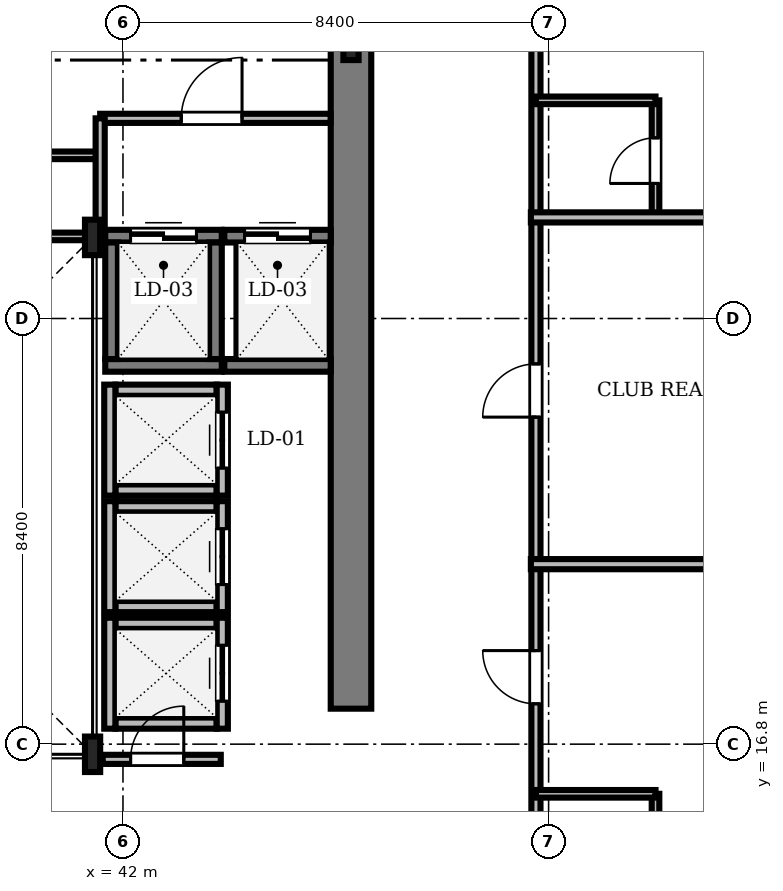
"""IFC4 building model, lengths in metres.
Left out: names, types, materials, properties, quantities, classifications, styles, units other than length and angle.
Written with IfcOpenShell. Run it as: python <this file> out.ifc"""

import sys

from ifc_helpers import new_model, si_unit, direction, frame, frame_2d, origin, origin_2d, place, context, subcontext, project, spatial, rectangle, i_section, extrude, source, transform, mapped, element, fill, save


model = new_model("IFC4")
c1 = context("Model", 3, precision=1e-05, world=origin(), true_north=direction((0.0, 1.0)))
c2 = subcontext(c1, "Body", "Model", "MODEL_VIEW")
j1 = project(units=[si_unit("LENGTHUNIT", "METRE"), si_unit("PLANEANGLEUNIT", "RADIAN")], contexts=[c1])
p1 = place(None, origin())
s1 = spatial("IfcSite", under=j1, at=p1, CompositionType="ELEMENT")
p2 = place(p1, origin())
s2 = spatial("IfcBuilding", under=s1, at=p2, CompositionType="ELEMENT")
p3 = place(p2, frame((0.0, 0.0, 211.05)))
s3 = spatial("IfcBuildingStorey", under=s2, at=p3, CompositionType="ELEMENT", Elevation=211.05)
m1 = source(origin(), c2, "Body", "SweptSolid", [
    extrude(rectangle(XDim=13.15, YDim=0.8, at=frame_2d((6.575, 0.0))), origin(), (0.0, 0.0, 1.0), 3.53),
])
p4 = place(p3, frame((46.5, 17.5, 0.0), z_axis=(0.0, 0.0, 1.0), x_axis=(0.0, 1.0, 0.0)))
e1 = element("IfcWall", 1, at=p4, inside=s3, PredefinedType="SHEAR", context=c2, shape_type="MappedRepresentation", body=[
    mapped(m1, transform((0.0, 0.0, 0.0), scale=1.0)),
])
m2 = source(origin(), c2, "Body", "SweptSolid", [
    extrude(i_section(OverallWidth=0.3, OverallDepth=0.7, WebThickness=0.017, FlangeThickness=0.032, FilletRadius=0.027, at=origin_2d()), origin(), (0.0, 0.0, 1.0), 3.53),
])
for number, where, z_axis, x_axis in (
    (2, (41.4, 16.6, 0.0), (0.0, 0.0, 1.0), (1.0, 0.0, 0.0)),
    (3, (41.4, 26.8, 0.0), (0.0, 0.0, 1.0), (1.0, 0.0, 0.0)),
    (4, (46.5, 30.65, 0.0), (0.0, 0.0, 1.0), (1.0, 0.0, 0.0)),
):
    element("IfcColumn", number, at=place(p3, frame(where, z_axis=z_axis, x_axis=x_axis)), inside=s3, PredefinedType="COLUMN", context=c2, shape_type="MappedRepresentation", body=[
        mapped(m2, transform((0.0, 0.0, 0.0), scale=1.0)),
    ])
m3 = source(origin(), c2, "Body", "SweptSolid", [
    extrude(rectangle(XDim=2.0, YDim=0.22, at=frame_2d((1.0, 0.0))), origin(), (0.0, 0.0, 1.0), 3.53),
])
for number, where, z_axis, x_axis in (
    (5, (41.85, 21.815, 0.0), (0.0, 0.0, 1.0), (1.0, 0.0, 0.0)),
    (6, (41.85, 23.785, 0.0), (0.0, 0.0, 1.0), (1.0, 0.0, 0.0)),
):
    element("IfcWall", number, at=place(p3, frame(where, z_axis=z_axis, x_axis=x_axis)), inside=s3, PredefinedType="SOLIDWALL", context=c2, shape_type="MappedRepresentation", body=[
        mapped(m3, transform((0.0, 0.0, 0.0), scale=1.0)),
    ])
m4 = source(origin(), c2, "Body", "SweptSolid", [
    extrude(rectangle(XDim=2.19, YDim=0.22, at=frame_2d((1.095, 0.0))), origin(), (0.0, 0.0, 1.0), 3.53),
])
p5 = place(p3, frame((41.74, 21.705, 0.0), z_axis=(0.0, 0.0, 1.0), x_axis=(0.0, 1.0, 0.0)))
e7 = element("IfcWall", 7, at=p5, inside=s3, PredefinedType="SOLIDWALL", context=c2, shape_type="MappedRepresentation", body=[
    mapped(m4, transform((0.0, 0.0, 0.0), scale=1.0)),
])
p6 = place(p3, frame((43.96, 21.705, 0.0), z_axis=(0.0, 0.0, 1.0), x_axis=(0.0, 1.0, 0.0)))
e8 = element("IfcWall", 8, at=p6, inside=s3, PredefinedType="SOLIDWALL", context=c2, shape_type="MappedRepresentation", body=[
    mapped(m4, transform((0.0, 0.0, 0.0), scale=1.0)),
])
m5 = source(origin(), c2, "Body", "SweptSolid", [
    extrude(rectangle(XDim=1.1, YDim=2.2, at=frame_2d((0.55, 1.1))), frame((0.0, 0.12, 0.0), z_axis=(0.0, -1.0, 0.0), x_axis=(1.0, 0.0, 0.0)), (0.0, 0.0, 1.0), 0.24),
])
p7 = place(p6, frame((0.545, 0.0, 0.0)))
e9 = element("IfcOpeningElement", 9, at=p7, cuts=e8, PredefinedType="OPENING", context=c2, shape_type="MappedRepresentation", body=[
    mapped(m5, transform((0.0, 0.0, 0.0), scale=1.0)),
])
for number, where, z_axis, x_axis in (
    (10, (41.85, 19.515, 0.0), (0.0, 0.0, 1.0), (1.0, 0.0, 0.0)),
    (11, (41.85, 21.485, 0.0), (0.0, 0.0, 1.0), (1.0, 0.0, 0.0)),
):
    element("IfcWall", number, at=place(p3, frame(where, z_axis=z_axis, x_axis=x_axis)), inside=s3, PredefinedType="SOLIDWALL", context=c2, shape_type="MappedRepresentation", body=[
        mapped(m3, transform((0.0, 0.0, 0.0), scale=1.0)),
    ])
p8 = place(p3, frame((41.74, 19.405, 0.0), z_axis=(0.0, 0.0, 1.0), x_axis=(0.0, 1.0, 0.0)))
e12 = element("IfcWall", 12, at=p8, inside=s3, PredefinedType="SOLIDWALL", context=c2, shape_type="MappedRepresentation", body=[
    mapped(m4, transform((0.0, 0.0, 0.0), scale=1.0)),
])
p9 = place(p3, frame((43.96, 19.405, 0.0), z_axis=(0.0, 0.0, 1.0), x_axis=(0.0, 1.0, 0.0)))
e13 = element("IfcWall", 13, at=p9, inside=s3, PredefinedType="SOLIDWALL", context=c2, shape_type="MappedRepresentation", body=[
    mapped(m4, transform((0.0, 0.0, 0.0), scale=1.0)),
])
p10 = place(p9, frame((0.545, 0.0, 0.0)))
e14 = element("IfcOpeningElement", 14, at=p10, cuts=e13, PredefinedType="OPENING", context=c2, shape_type="MappedRepresentation", body=[
    mapped(m5, transform((0.0, 0.0, 0.0), scale=1.0)),
])
for number, where, z_axis, x_axis in (
    (15, (41.85, 17.215, 0.0), (0.0, 0.0, 1.0), (1.0, 0.0, 0.0)),
    (16, (41.85, 19.185, 0.0), (0.0, 0.0, 1.0), (1.0, 0.0, 0.0)),
):
    element("IfcWall", number, at=place(p3, frame(where, z_axis=z_axis, x_axis=x_axis)), inside=s3, PredefinedType="SOLIDWALL", context=c2, shape_type="MappedRepresentation", body=[
        mapped(m3, transform((0.0, 0.0, 0.0), scale=1.0)),
    ])
p11 = place(p3, frame((41.74, 17.105, 0.0), z_axis=(0.0, 0.0, 1.0), x_axis=(0.0, 1.0, 0.0)))
e17 = element("IfcWall", 17, at=p11, inside=s3, PredefinedType="SOLIDWALL", context=c2, shape_type="MappedRepresentation", body=[
    mapped(m4, transform((0.0, 0.0, 0.0), scale=1.0)),
])
p12 = place(p3, frame((43.96, 17.105, 0.0), z_axis=(0.0, 0.0, 1.0), x_axis=(0.0, 1.0, 0.0)))
e18 = element("IfcWall", 18, at=p12, inside=s3, PredefinedType="SOLIDWALL", context=c2, shape_type="MappedRepresentation", body=[
    mapped(m4, transform((0.0, 0.0, 0.0), scale=1.0)),
])
p13 = place(p12, frame((0.545, 0.0, 0.0)))
e19 = element("IfcOpeningElement", 19, at=p13, cuts=e18, PredefinedType="OPENING", context=c2, shape_type="MappedRepresentation", body=[
    mapped(m5, transform((0.0, 0.0, 0.0), scale=1.0)),
])
m6 = source(origin(), c2, "Body", "SweptSolid", [
    extrude(rectangle(XDim=2.3, YDim=0.25, at=frame_2d((1.15, 0.0))), origin(), (0.0, 0.0, 1.0), 3.53),
])
p14 = place(p3, frame((41.65, 24.275, 0.0), z_axis=(0.0, 0.0, 1.0), x_axis=(1.0, 0.0, 0.0)))
e20 = element("IfcWall", 20, at=p14, inside=s3, PredefinedType="SOLIDWALL", context=c2, shape_type="MappedRepresentation", body=[
    mapped(m6, transform((0.0, 0.0, 0.0), scale=1.0)),
])
p15 = place(p3, frame((41.65, 26.825, 0.0), z_axis=(0.0, 0.0, 1.0), x_axis=(1.0, 0.0, 0.0)))
e21 = element("IfcWall", 21, at=p15, inside=s3, PredefinedType="SOLIDWALL", context=c2, shape_type="MappedRepresentation", body=[
    mapped(m6, transform((0.0, 0.0, 0.0), scale=1.0)),
])
m7 = source(origin(), c2, "Body", "SweptSolid", [
    extrude(rectangle(XDim=1.3, YDim=2.3, at=frame_2d((0.65, 1.15))), frame((0.0, 0.135, 0.0), z_axis=(0.0, -1.0, 0.0), x_axis=(1.0, 0.0, 0.0)), (0.0, 0.0, 1.0), 0.27),
])
p16 = place(p15, frame((0.5, 0.0, 0.0)))
e22 = element("IfcOpeningElement", 22, at=p16, cuts=e21, PredefinedType="OPENING", context=c2, shape_type="MappedRepresentation", body=[
    mapped(m7, transform((0.0, 0.0, 0.0), scale=1.0)),
])
for number, where, z_axis, x_axis in (
    (23, (41.775, 24.4, 0.0), (0.0, 0.0, 1.0), (0.0, 1.0, 0.0)),
    (24, (43.825, 24.4, 0.0), (0.0, 0.0, 1.0), (0.0, 1.0, 0.0)),
):
    element("IfcWall", number, at=place(p3, frame(where, z_axis=z_axis, x_axis=x_axis)), inside=s3, PredefinedType="SOLIDWALL", context=c2, shape_type="MappedRepresentation", body=[
        mapped(m6, transform((0.0, 0.0, 0.0), scale=1.0)),
    ])
m8 = source(origin(), c2, "Body", "SweptSolid", [
    extrude(rectangle(XDim=2.1, YDim=0.25, at=frame_2d((1.05, 0.0))), origin(), (0.0, 0.0, 1.0), 3.53),
])
p17 = place(p3, frame((44.0, 24.275, 0.0), z_axis=(0.0, 0.0, 1.0), x_axis=(1.0, 0.0, 0.0)))
e25 = element("IfcWall", 25, at=p17, inside=s3, PredefinedType="SOLIDWALL", context=c2, shape_type="MappedRepresentation", body=[
    mapped(m8, transform((0.0, 0.0, 0.0), scale=1.0)),
])
p18 = place(p3, frame((44.0, 26.825, 0.0), z_axis=(0.0, 0.0, 1.0), x_axis=(1.0, 0.0, 0.0)))
e26 = element("IfcWall", 26, at=p18, inside=s3, PredefinedType="SOLIDWALL", context=c2, shape_type="MappedRepresentation", body=[
    mapped(m8, transform((0.0, 0.0, 0.0), scale=1.0)),
])
p19 = place(p18, frame((0.4, 0.0, 0.0)))
e27 = element("IfcOpeningElement", 27, at=p19, cuts=e26, PredefinedType="OPENING", context=c2, shape_type="MappedRepresentation", body=[
    mapped(m7, transform((0.0, 0.0, 0.0), scale=1.0)),
])
m9 = source(origin(), c2, "Body", "SweptSolid", [
    extrude(rectangle(XDim=27.59, YDim=0.18, at=frame_2d((13.795, 0.0))), origin(), (0.0, 0.0, 1.0), 2.972),
])
p20 = place(p3, frame((50.15, 13.51, 0.0), z_axis=(0.0, 0.0, 1.0), x_axis=(0.0, 1.0, 0.0)))
e28 = element("IfcWall", 28, at=p20, inside=s3, PredefinedType="PARTITIONING", context=c2, shape_type="MappedRepresentation", body=[
    mapped(m9, transform((0.0, 0.0, 0.0), scale=1.0)),
])
m10 = source(origin(), c2, "Body", "SweptSolid", [
    extrude(rectangle(XDim=1.05, YDim=2.2, at=frame_2d((0.525, 1.1))), frame((0.0, 0.1, 0.0), z_axis=(0.0, -1.0, 0.0), x_axis=(1.0, 0.0, 0.0)), (0.0, 0.0, 1.0), 0.2),
])
p21 = place(p20, frame((4.086, 0.0, 0.0)))
e29 = element("IfcOpeningElement", 29, at=p21, cuts=e28, PredefinedType="OPENING", context=c2, shape_type="MappedRepresentation", body=[
    mapped(m10, transform((0.0, 0.0, 0.0), scale=1.0)),
])
p22 = place(p20, frame((9.744, 0.0, 0.0)))
e30 = element("IfcOpeningElement", 30, at=p22, cuts=e28, PredefinedType="OPENING", context=c2, shape_type="MappedRepresentation", body=[
    mapped(m10, transform((0.0, 0.0, 0.0), scale=1.0)),
])
p23 = place(p20, frame((17.771, 0.0, 0.0)))
e31 = element("IfcOpeningElement", 31, at=p23, cuts=e28, PredefinedType="OPENING", context=c2, shape_type="MappedRepresentation", body=[
    mapped(m10, transform((0.0, 0.0, 0.0), scale=1.0)),
])
p24 = place(p20, frame((24.614, 0.0, 0.0)))
e32 = element("IfcOpeningElement", 32, at=p24, cuts=e28, PredefinedType="OPENING", context=c2, shape_type="MappedRepresentation", body=[
    mapped(m10, transform((0.0, 0.0, 0.0), scale=1.0)),
])
m11 = source(origin(), c2, "Body", "SweptSolid", [
    extrude(rectangle(XDim=4.548, YDim=0.18, at=frame_2d((2.274, 0.0))), origin(), (0.0, 0.0, 1.0), 3.162),
])
p25 = place(p3, frame((41.55, 29.15, 0.0), z_axis=(0.0, 0.0, 1.0), x_axis=(1.0, 0.0, 0.0)))
e33 = element("IfcWall", 33, at=p25, inside=s3, PredefinedType="PARTITIONING", context=c2, shape_type="MappedRepresentation", body=[
    mapped(m11, transform((0.0, 0.0, 0.0), scale=1.0)),
])
m12 = source(origin(), c2, "Body", "SweptSolid", [
    extrude(rectangle(XDim=1.2, YDim=2.2, at=frame_2d((0.6, 1.1))), frame((0.0, 0.1, 0.0), z_axis=(0.0, -1.0, 0.0), x_axis=(1.0, 0.0, 0.0)), (0.0, 0.0, 1.0), 0.2),
])
p26 = place(p25, frame((1.6, 0.0, 0.0)))
e34 = element("IfcOpeningElement", 34, at=p26, cuts=e33, PredefinedType="OPENING", context=c2, shape_type="MappedRepresentation", body=[
    mapped(m12, transform((0.0, 0.0, 0.0), scale=1.0)),
])
m13 = source(origin(), c2, "Body", "SweptSolid", [
    extrude(rectangle(XDim=2.74, YDim=0.15, at=frame_2d((1.37, 0.0))), origin(), (0.0, 0.0, 1.0), 3.53),
])
p27 = place(p3, frame((38.78, 28.42, 0.0), z_axis=(0.0, 0.0, 1.0), x_axis=(1.0, 0.0, 0.0)))
e35 = element("IfcWall", 35, at=p27, inside=s3, PredefinedType="PARTITIONING", context=c2, shape_type="MappedRepresentation", body=[
    mapped(m13, transform((0.0, 0.0, 0.0), scale=1.0)),
])
m14 = source(origin(), c2, "Body", "SweptSolid", [
    extrude(rectangle(XDim=0.92, YDim=2.1, at=frame_2d((0.46, 1.05))), frame((0.0, 0.085, 0.0), z_axis=(0.0, -1.0, 0.0), x_axis=(1.0, 0.0, 0.0)), (0.0, 0.0, 1.0), 0.17),
])
p28 = place(p27, frame((0.63, 0.0, 0.0)))
e36 = element("IfcOpeningElement", 36, at=p28, cuts=e35, PredefinedType="OPENING", context=c2, shape_type="MappedRepresentation", body=[
    mapped(m14, transform((0.0, 0.0, 0.0), scale=1.0)),
])
m15 = source(origin(), c2, "Body", "SweptSolid", [
    extrude(rectangle(XDim=2.33, YDim=0.18, at=frame_2d((1.165, 0.0))), origin(), (0.0, 0.0, 1.0), 2.972),
])
p29 = place(p3, frame((41.6, 16.5, 0.0), z_axis=(0.0, 0.0, 1.0), x_axis=(1.0, 0.0, 0.0)))
e37 = element("IfcWall", 37, at=p29, inside=s3, PredefinedType="PARTITIONING", context=c2, shape_type="MappedRepresentation", body=[
    mapped(m15, transform((0.0, 0.0, 0.0), scale=1.0)),
])
p30 = place(p29, frame((0.55, 0.0, 0.0)))
e38 = element("IfcOpeningElement", 38, at=p30, cuts=e37, PredefinedType="OPENING", context=c2, shape_type="MappedRepresentation", body=[
    mapped(m10, transform((0.0, 0.0, 0.0), scale=1.0)),
])
m16 = source(origin(), c2, "Body", "SweptSolid", [
    extrude(rectangle(XDim=2.29, YDim=0.15, at=frame_2d((1.145, 0.0))), origin(), (0.0, 0.0, 1.0), 2.972),
])
p31 = place(p3, frame((52.51, 13.53, 0.0), z_axis=(0.0, 0.0, 1.0), x_axis=(0.0, 1.0, 0.0)))
e39 = element("IfcWall", 39, at=p31, inside=s3, PredefinedType="PARTITIONING", context=c2, shape_type="MappedRepresentation", body=[
    mapped(m16, transform((0.0, 0.0, 0.0), scale=1.0)),
])
m17 = source(origin(), c2, "Body", "SweptSolid", [
    extrude(rectangle(XDim=0.9, YDim=2.1, at=frame_2d((0.45, 1.05))), frame((0.0, 0.085, 0.0), z_axis=(0.0, -1.0, 0.0), x_axis=(1.0, 0.0, 0.0)), (0.0, 0.0, 1.0), 0.17),
])
p32 = place(p31, frame((0.65, 0.0, 0.0)))
e40 = element("IfcOpeningElement", 40, at=p32, cuts=e39, PredefinedType="OPENING", context=c2, shape_type="MappedRepresentation", body=[
    mapped(m17, transform((0.0, 0.0, 0.0), scale=1.0)),
])
m18 = source(origin(), c2, "Body", "SweptSolid", [
    extrude(rectangle(XDim=2.29, YDim=0.15, at=frame_2d((1.145, 0.0))), origin(), (0.0, 0.0, 1.0), 2.972),
])
p33 = place(p3, frame((52.51, 27.215, 0.0), z_axis=(0.0, 0.0, 1.0), x_axis=(0.0, 1.0, 0.0)))
e41 = element("IfcWall", 41, at=p33, inside=s3, PredefinedType="PARTITIONING", context=c2, shape_type="MappedRepresentation", body=[
    mapped(m18, transform((0.0, 0.0, 0.0), scale=1.0)),
])
p34 = place(p33, frame((0.65, 0.0, 0.0)))
e42 = element("IfcOpeningElement", 42, at=p34, cuts=e41, PredefinedType="OPENING", context=c2, shape_type="MappedRepresentation", body=[
    mapped(m17, transform((0.0, 0.0, 0.0), scale=1.0)),
])
m19 = source(origin(), c2, "Body", "SweptSolid", [
    extrude(rectangle(XDim=7.528, YDim=0.2, at=frame_2d((3.764, 0.0))), origin(), (0.0, 0.0, 1.0), 2.772),
])
p35 = place(p3, frame((50.05, 20.352, 0.0), z_axis=(0.0, 0.0, 1.0), x_axis=(1.0, 0.0, 0.0)))
e43 = element("IfcWall", 43, at=p35, inside=s3, PredefinedType="PARTITIONING", context=c2, shape_type="MappedRepresentation", body=[
    mapped(m19, transform((0.0, 0.0, 0.0), scale=1.0)),
])
m20 = source(origin(), c2, "Body", "SweptSolid", [
    extrude(rectangle(XDim=7.72, YDim=0.2, at=frame_2d((3.86, 0.0))), origin(), (0.0, 0.0, 1.0), 2.772),
])
p36 = place(p3, frame((50.05, 27.195, 0.0), z_axis=(0.0, 0.0, 1.0), x_axis=(1.0, 0.0, 0.0)))
e44 = element("IfcWall", 44, at=p36, inside=s3, PredefinedType="PARTITIONING", context=c2, shape_type="MappedRepresentation", body=[
    mapped(m20, transform((0.0, 0.0, 0.0), scale=1.0)),
])
m21 = source(origin(), c2, "Body", "SweptSolid", [
    extrude(rectangle(XDim=2.74, YDim=0.15, at=frame_2d((1.37, 0.0))), origin(), (0.0, 0.0, 1.0), 2.972),
])
p37 = place(p3, frame((38.78, 26.82, 0.0), z_axis=(0.0, 0.0, 1.0), x_axis=(1.0, 0.0, 0.0)))
e45 = element("IfcWall", 45, at=p37, inside=s3, PredefinedType="PARTITIONING", context=c2, shape_type="MappedRepresentation", body=[
    mapped(m21, transform((0.0, 0.0, 0.0), scale=1.0)),
])
m22 = source(origin(), c2, "Body", "SweptSolid", [
    extrude(rectangle(XDim=2.36, YDim=0.15, at=frame_2d((1.18, 0.0))), origin(), (0.0, 0.0, 1.0), 3.53),
])
for number, where, z_axis, x_axis in (
    (46, (50.15, 15.82, 0.0), (0.0, 0.0, 1.0), (1.0, 0.0, 0.0)),
    (47, (50.15, 29.505, 0.0), (0.0, 0.0, 1.0), (1.0, 0.0, 0.0)),
):
    element("IfcWall", number, at=place(p3, frame(where, z_axis=z_axis, x_axis=x_axis)), inside=s3, PredefinedType="PARTITIONING", context=c2, shape_type="MappedRepresentation", body=[
        mapped(m22, transform((0.0, 0.0, 0.0), scale=1.0)),
    ])
m23 = source(origin(), c2, "Body", "SweptSolid", [
    extrude(rectangle(XDim=2.35, YDim=0.18, at=frame_2d((1.175, 0.0))), origin(), (0.0, 0.0, 1.0), 2.972),
])
p38 = place(p3, frame((41.55, 26.8, 0.0), z_axis=(0.0, 0.0, 1.0), x_axis=(0.0, 1.0, 0.0)))
e48 = element("IfcWall", 48, at=p38, inside=s3, PredefinedType="PARTITIONING", context=c2, shape_type="MappedRepresentation", body=[
    mapped(m23, transform((0.0, 0.0, 0.0), scale=1.0)),
])
m24 = source(origin(), c2, "Body", "SweptSolid", [
    extrude(rectangle(XDim=1.1, YDim=2.2, at=frame_2d((0.55, 1.1))), frame((0.0, 0.025, 0.0), z_axis=(0.0, -1.0, 0.0), x_axis=(1.0, 0.0, 0.0)), (0.0, 0.0, 1.0), 0.05),
])
p39 = place(p7, origin())
e49 = element("IfcDoor", 49, at=p39, inside=s3, OperationType="DOUBLE_DOOR_SLIDING", PredefinedType="DOOR", context=c2, shape_type="MappedRepresentation", body=[
    mapped(m24, transform((0.0, 0.0, 0.0), scale=1.0)),
])
fill(e9, e49)
p40 = place(p10, origin())
e50 = element("IfcDoor", 50, at=p40, inside=s3, OperationType="DOUBLE_DOOR_SLIDING", PredefinedType="DOOR", context=c2, shape_type="MappedRepresentation", body=[
    mapped(m24, transform((0.0, 0.0, 0.0), scale=1.0)),
])
fill(e14, e50)
p41 = place(p13, origin())
e51 = element("IfcDoor", 51, at=p41, inside=s3, OperationType="DOUBLE_DOOR_SLIDING", PredefinedType="DOOR", context=c2, shape_type="MappedRepresentation", body=[
    mapped(m24, transform((0.0, 0.0, 0.0), scale=1.0)),
])
fill(e19, e51)
m25 = source(origin(), c2, "Body", "SweptSolid", [
    extrude(rectangle(XDim=1.3, YDim=2.3, at=frame_2d((0.65, 1.15))), frame((0.0, 0.025, 0.0), z_axis=(0.0, -1.0, 0.0), x_axis=(1.0, 0.0, 0.0)), (0.0, 0.0, 1.0), 0.05),
])
p42 = place(p16, origin())
e52 = element("IfcDoor", 52, at=p42, inside=s3, OperationType="DOUBLE_DOOR_SLIDING", PredefinedType="DOOR", context=c2, shape_type="MappedRepresentation", body=[
    mapped(m25, transform((0.0, 0.0, 0.0), scale=1.0)),
])
fill(e22, e52)
p43 = place(p19, origin())
e53 = element("IfcDoor", 53, at=p43, inside=s3, OperationType="DOUBLE_DOOR_SLIDING", PredefinedType="DOOR", context=c2, shape_type="MappedRepresentation", body=[
    mapped(m25, transform((0.0, 0.0, 0.0), scale=1.0)),
])
fill(e27, e53)
m26 = source(origin(), c2, "Body", "SweptSolid", [
    extrude(rectangle(XDim=1.05, YDim=2.2, at=frame_2d((0.525, 1.1))), frame((0.0, 0.025, 0.0), z_axis=(0.0, -1.0, 0.0), x_axis=(1.0, 0.0, 0.0)), (0.0, 0.0, 1.0), 0.05),
])
p44 = place(p21, origin())
e54 = element("IfcDoor", 54, at=p44, inside=s3, OperationType="SINGLE_SWING_RIGHT", PredefinedType="DOOR", context=c2, shape_type="MappedRepresentation", body=[
    mapped(m26, transform((0.0, 0.0, 0.0), scale=1.0)),
])
fill(e29, e54)
p45 = place(p22, origin())
e55 = element("IfcDoor", 55, at=p45, inside=s3, OperationType="SINGLE_SWING_LEFT", PredefinedType="DOOR", context=c2, shape_type="MappedRepresentation", body=[
    mapped(m26, transform((0.0, 0.0, 0.0), scale=1.0)),
])
fill(e30, e55)
m27 = source(origin(), c2, "Body", "SweptSolid", [
    extrude(rectangle(XDim=1.2, YDim=2.2, at=frame_2d((0.6, 1.1))), frame((0.0, 0.025, 0.0), z_axis=(0.0, -1.0, 0.0), x_axis=(1.0, 0.0, 0.0)), (0.0, 0.0, 1.0), 0.05),
])
p46 = place(p26, origin())
e56 = element("IfcDoor", 56, at=p46, inside=s3, OperationType="SINGLE_SWING_RIGHT", PredefinedType="DOOR", context=c2, shape_type="MappedRepresentation", body=[
    mapped(m27, transform((0.0, 0.0, 0.0), scale=1.0)),
])
fill(e34, e56)
p47 = place(p30, origin())
e57 = element("IfcDoor", 57, at=p47, inside=s3, OperationType="SINGLE_SWING_RIGHT", PredefinedType="DOOR", context=c2, shape_type="MappedRepresentation", body=[
    mapped(m26, transform((0.0, 0.0, 0.0), scale=1.0)),
])
fill(e38, e57)
m28 = source(origin(), c2, "Body", "SweptSolid", [
    extrude(rectangle(XDim=0.9, YDim=2.1, at=frame_2d((0.45, 1.05))), frame((0.0, 0.025, 0.0), z_axis=(0.0, -1.0, 0.0), x_axis=(1.0, 0.0, 0.0)), (0.0, 0.0, 1.0), 0.05),
])
p48 = place(p34, origin())
e58 = element("IfcDoor", 58, at=p48, inside=s3, OperationType="SINGLE_SWING_LEFT", PredefinedType="DOOR", context=c2, shape_type="MappedRepresentation", body=[
    mapped(m28, transform((0.0, 0.0, 0.0), scale=1.0)),
])
fill(e42, e58)
save(model, sys.argv[1])
